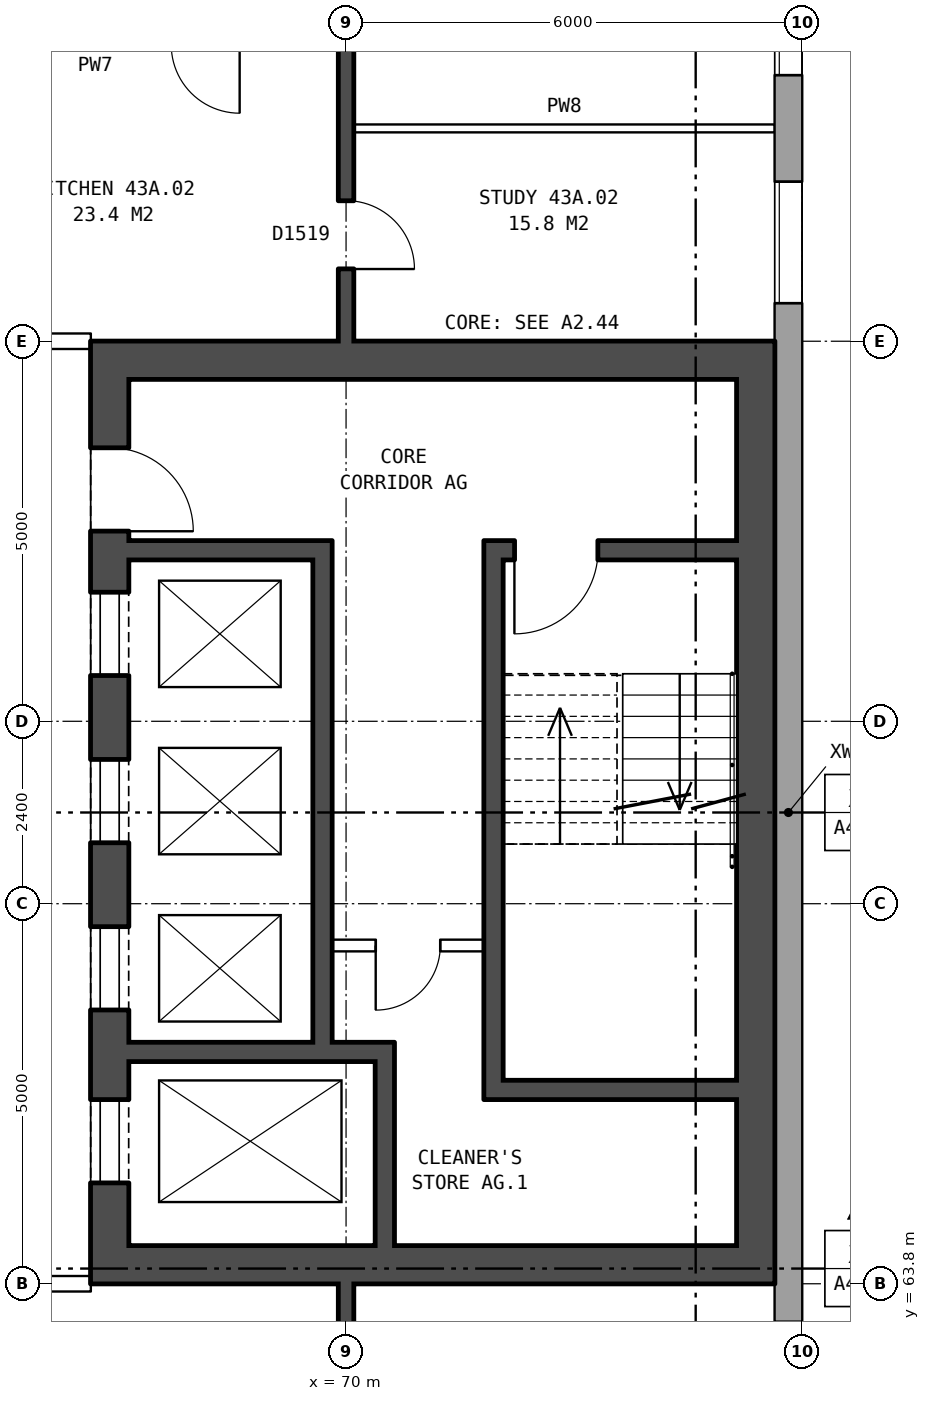
"""IFC4 building model, lengths in metres.
Left out: names, types, materials, properties, quantities, classifications, styles, units other than length and angle.
Written with IfcOpenShell. Run it as: python <this file> out.ifc"""

import sys

from ifc_helpers import new_model, si_unit, direction, frame, frame_2d, origin, place, context, subcontext, project, spatial, rectangle, extrude, element, fill, save


model = new_model("IFC4")
c1 = context("Model", 3, precision=1e-05, world=origin(), true_north=direction((0.0, 1.0)))
c2 = subcontext(c1, "Body", "Model", "MODEL_VIEW")
j1 = project(units=[si_unit("LENGTHUNIT", "METRE"), si_unit("PLANEANGLEUNIT", "RADIAN")], contexts=[c1])
p1 = place(None, origin())
s1 = spatial("IfcSite", under=j1, at=p1, CompositionType="ELEMENT")
p2 = place(p1, origin())
s2 = spatial("IfcBuilding", under=s1, at=p2, CompositionType="ELEMENT")
p3 = place(p2, frame((0.0, 0.0, 154.7)))
s3 = spatial("IfcBuildingStorey", under=s2, at=p3, CompositionType="ELEMENT", Elevation=154.7)
p4 = place(p3, frame((75.82, 57.075, 0.0), z_axis=(0.0, 0.0, 1.0), x_axis=(0.0, 1.0, 0.0)))
e1 = element("IfcWall", 1, at=p4, inside=s3, PredefinedType="STANDARD", context=c2, shape_type="SweptSolid", body=[
    extrude(rectangle(XDim=25.851, YDim=0.36, at=frame_2d((12.925, 0.0))), origin(), (0.0, 0.0, 1.0), 2.85),
])
p5 = place(p4, frame((1.625, 0.0, 0.8)))
e2 = element("IfcOpeningElement", 2, at=p5, cuts=e1, PredefinedType="OPENING", context=c2, shape_type="SweptSolid", body=[
    extrude(rectangle(XDim=1.6, YDim=1.8, at=frame_2d((0.8, 0.9))), frame((0.0, 0.19, 0.0), z_axis=(0.0, -1.0, 0.0), x_axis=(1.0, 0.0, 0.0)), (0.0, 0.0, 1.0), 0.38),
])
p6 = place(p4, frame((4.625, 0.0, 0.8)))
e3 = element("IfcOpeningElement", 3, at=p6, cuts=e1, PredefinedType="OPENING", context=c2, shape_type="SweptSolid", body=[
    extrude(rectangle(XDim=1.6, YDim=1.8, at=frame_2d((0.8, 0.9))), frame((0.0, 0.19, 0.0), z_axis=(0.0, -1.0, 0.0), x_axis=(1.0, 0.0, 0.0)), (0.0, 0.0, 1.0), 0.38),
])
p7 = place(p4, frame((19.625, 0.0, 0.8)))
e4 = element("IfcOpeningElement", 4, at=p7, cuts=e1, PredefinedType="OPENING", context=c2, shape_type="SweptSolid", body=[
    extrude(rectangle(XDim=1.6, YDim=1.8, at=frame_2d((0.8, 0.9))), frame((0.0, 0.19, 0.0), z_axis=(0.0, -1.0, 0.0), x_axis=(1.0, 0.0, 0.0)), (0.0, 0.0, 1.0), 0.38),
])
p8 = place(p4, frame((22.625, 0.0, 0.8)))
e5 = element("IfcOpeningElement", 5, at=p8, cuts=e1, PredefinedType="OPENING", context=c2, shape_type="SweptSolid", body=[
    extrude(rectangle(XDim=1.6, YDim=1.8, at=frame_2d((0.8, 0.9))), frame((0.0, 0.19, 0.0), z_axis=(0.0, -1.0, 0.0), x_axis=(1.0, 0.0, 0.0)), (0.0, 0.0, 1.0), 0.38),
])
p9 = place(p3, frame((66.89, 63.8, 0.0), z_axis=(0.0, 0.0, 1.0), x_axis=(0.0, 1.0, 0.0)))
e6 = element("IfcWall", 6, at=p9, inside=s3, PredefinedType="SHEAR", context=c2, shape_type="SweptSolid", body=[
    extrude(rectangle(XDim=12.4, YDim=0.5, at=frame_2d((6.2, 0.0))), origin(), (0.0, 0.0, 1.0), 2.85),
])
p10 = place(p9, frame((1.325, 0.0, 0.0)))
e7 = element("IfcOpeningElement", 7, at=p10, cuts=e6, PredefinedType="OPENING", context=c2, shape_type="SweptSolid", body=[
    extrude(rectangle(XDim=1.1, YDim=2.1, at=frame_2d((0.55, 1.05))), frame((0.0, 0.26, 0.0), z_axis=(0.0, -1.0, 0.0), x_axis=(1.0, 0.0, 0.0)), (0.0, 0.0, 1.0), 0.52),
])
p11 = place(p9, frame((3.6, 0.0, 0.0)))
e8 = element("IfcOpeningElement", 8, at=p11, cuts=e6, PredefinedType="OPENING", context=c2, shape_type="SweptSolid", body=[
    extrude(rectangle(XDim=1.1, YDim=2.1, at=frame_2d((0.55, 1.05))), frame((0.0, 0.26, 0.0), z_axis=(0.0, -1.0, 0.0), x_axis=(1.0, 0.0, 0.0)), (0.0, 0.0, 1.0), 0.52),
])
p12 = place(p9, frame((5.8, 0.0, 0.0)))
e9 = element("IfcOpeningElement", 9, at=p12, cuts=e6, PredefinedType="OPENING", context=c2, shape_type="SweptSolid", body=[
    extrude(rectangle(XDim=1.1, YDim=2.1, at=frame_2d((0.55, 1.05))), frame((0.0, 0.26, 0.0), z_axis=(0.0, -1.0, 0.0), x_axis=(1.0, 0.0, 0.0)), (0.0, 0.0, 1.0), 0.52),
])
p13 = place(p9, frame((8.0, 0.0, 0.0)))
e10 = element("IfcOpeningElement", 10, at=p13, cuts=e6, PredefinedType="OPENING", context=c2, shape_type="SweptSolid", body=[
    extrude(rectangle(XDim=1.1, YDim=2.1, at=frame_2d((0.55, 1.05))), frame((0.0, 0.26, 0.0), z_axis=(0.0, -1.0, 0.0), x_axis=(1.0, 0.0, 0.0)), (0.0, 0.0, 1.0), 0.52),
])
p14 = place(p9, frame((9.9, 0.0, 0.0)))
e11 = element("IfcOpeningElement", 11, at=p14, cuts=e6, PredefinedType="OPENING", context=c2, shape_type="SweptSolid", body=[
    extrude(rectangle(XDim=1.1, YDim=2.1, at=frame_2d((0.55, 1.05))), frame((0.0, 0.26, 0.0), z_axis=(0.0, -1.0, 0.0), x_axis=(1.0, 0.0, 0.0)), (0.0, 0.0, 1.0), 0.52),
])
p15 = place(p3, frame((75.39, 63.8, 0.0), z_axis=(0.0, 0.0, 1.0), x_axis=(0.0, 1.0, 0.0)))
e12 = element("IfcWall", 12, at=p15, inside=s3, PredefinedType="SHEAR", context=c2, shape_type="SweptSolid", body=[
    extrude(rectangle(XDim=12.4, YDim=0.5, at=frame_2d((6.2, 0.0))), origin(), (0.0, 0.0, 1.0), 2.85),
])
for number, where, z_axis, x_axis in (
    (13, (67.14, 64.05, 0.0), (0.0, 0.0, 1.0), (1.0, 0.0, 0.0)),
    (14, (67.14, 75.95, 0.0), (0.0, 0.0, 1.0), (1.0, 0.0, 0.0)),
):
    element("IfcWall", number, at=place(p3, frame(where, z_axis=z_axis, x_axis=x_axis)), inside=s3, PredefinedType="SHEAR", context=c2, shape_type="SweptSolid", body=[
        extrude(rectangle(XDim=8.0, YDim=0.5, at=frame_2d((4.0, 0.0))), origin(), (0.0, 0.0, 1.0), 2.85),
    ])
p16 = place(p3, frame((72.065, 66.35, 0.0), z_axis=(0.0, 0.0, 1.0), x_axis=(1.0, 0.0, 0.0)))
e15 = element("IfcWall", 15, at=p16, inside=s3, PredefinedType="SHEAR", context=c2, shape_type="SweptSolid", body=[
    extrude(rectangle(XDim=3.075, YDim=0.25, at=frame_2d((1.538, 0.0))), origin(), (0.0, 0.0, 1.0), 2.85),
])
p17 = place(p3, frame((67.14, 66.85, 0.0), z_axis=(0.0, 0.0, 1.0), x_axis=(1.0, 0.0, 0.0)))
e16 = element("IfcWall", 16, at=p17, inside=s3, PredefinedType="SHEAR", context=c2, shape_type="SweptSolid", body=[
    extrude(rectangle(XDim=3.495, YDim=0.25, at=frame_2d((1.748, 0.0))), origin(), (0.0, 0.0, 1.0), 2.85),
])
p18 = place(p3, frame((69.815, 68.25, 0.0), z_axis=(0.0, 0.0, 1.0), x_axis=(1.0, 0.0, 0.0)))
e17 = element("IfcWall", 17, at=p18, inside=s3, PredefinedType="PARTITIONING", context=c2, shape_type="SweptSolid", body=[
    extrude(rectangle(XDim=2.0, YDim=0.15, at=frame_2d((1.0, 0.0))), origin(), (0.0, 0.0, 1.0), 2.85),
])
p19 = place(p18, frame((0.575, 0.0, 0.0)))
e18 = element("IfcOpeningElement", 18, at=p19, cuts=e17, PredefinedType="OPENING", context=c2, shape_type="SweptSolid", body=[
    extrude(rectangle(XDim=0.85, YDim=2.1, at=frame_2d((0.425, 1.05))), frame((0.0, 0.085, 0.0), z_axis=(0.0, -1.0, 0.0), x_axis=(1.0, 0.0, 0.0)), (0.0, 0.0, 1.0), 0.17),
])
p20 = place(p3, frame((67.14, 73.45, 0.0), z_axis=(0.0, 0.0, 1.0), x_axis=(1.0, 0.0, 0.0)))
e19 = element("IfcWall", 19, at=p20, inside=s3, PredefinedType="SHEAR", context=c2, shape_type="SweptSolid", body=[
    extrude(rectangle(XDim=2.425, YDim=0.25, at=frame_2d((1.212, 0.0))), origin(), (0.0, 0.0, 1.0), 2.85),
])
p21 = place(p3, frame((72.065, 73.45, 0.0), z_axis=(0.0, 0.0, 1.0), x_axis=(1.0, 0.0, 0.0)))
e20 = element("IfcWall", 20, at=p21, inside=s3, PredefinedType="SHEAR", context=c2, shape_type="SweptSolid", body=[
    extrude(rectangle(XDim=3.075, YDim=0.25, at=frame_2d((1.538, 0.0))), origin(), (0.0, 0.0, 1.0), 2.85),
])
p22 = place(p21, frame((0.15, 0.0, 0.0)))
e21 = element("IfcOpeningElement", 21, at=p22, cuts=e20, PredefinedType="OPENING", context=c2, shape_type="SweptSolid", body=[
    extrude(rectangle(XDim=1.1, YDim=2.1, at=frame_2d((0.55, 1.05))), frame((0.0, 0.135, 0.0), z_axis=(0.0, -1.0, 0.0), x_axis=(1.0, 0.0, 0.0)), (0.0, 0.0, 1.0), 0.27),
])
p23 = place(p3, frame((69.69, 66.975, 0.0), z_axis=(0.0, 0.0, 1.0), x_axis=(0.0, 1.0, 0.0)))
e22 = element("IfcWall", 22, at=p23, inside=s3, PredefinedType="SHEAR", context=c2, shape_type="SweptSolid", body=[
    extrude(rectangle(XDim=6.6, YDim=0.25, at=frame_2d((3.3, 0.0))), origin(), (0.0, 0.0, 1.0), 2.85),
])
p24 = place(p3, frame((70.51, 64.3, 0.0), z_axis=(0.0, 0.0, 1.0), x_axis=(0.0, 1.0, 0.0)))
e23 = element("IfcWall", 23, at=p24, inside=s3, PredefinedType="SHEAR", context=c2, shape_type="SweptSolid", body=[
    extrude(rectangle(XDim=2.425, YDim=0.25, at=frame_2d((1.212, 0.0))), origin(), (0.0, 0.0, 1.0), 2.85),
])
p25 = place(p3, frame((71.94, 66.225, 0.0), z_axis=(0.0, 0.0, 1.0), x_axis=(0.0, 1.0, 0.0)))
e24 = element("IfcWall", 24, at=p25, inside=s3, PredefinedType="SHEAR", context=c2, shape_type="SweptSolid", body=[
    extrude(rectangle(XDim=7.35, YDim=0.25, at=frame_2d((3.675, 0.0))), origin(), (0.0, 0.0, 1.0), 2.85),
])
p26 = place(p3, frame((63.64, 63.8, 0.0), z_axis=(0.0, 0.0, 1.0), x_axis=(1.0, 0.0, 0.0)))
e25 = element("IfcWall", 25, at=p26, inside=s3, PredefinedType="PARTITIONING", context=c2, shape_type="SweptSolid", body=[
    extrude(rectangle(XDim=3.0, YDim=0.2, at=frame_2d((1.5, 0.0))), origin(), (0.0, 0.0, 1.0), 2.85),
])
p27 = place(p26, frame((1.18, 0.0, 0.0)))
e26 = element("IfcOpeningElement", 26, at=p27, cuts=e25, PredefinedType="OPENING", context=c2, shape_type="SweptSolid", body=[
    extrude(rectangle(XDim=1.0, YDim=2.1, at=frame_2d((0.5, 1.05))), frame((0.0, 0.11, 0.0), z_axis=(0.0, -1.0, 0.0), x_axis=(1.0, 0.0, 0.0)), (0.0, 0.0, 1.0), 0.22),
])
p28 = place(p3, frame((63.64, 76.2, 0.0), z_axis=(0.0, 0.0, 1.0), x_axis=(1.0, 0.0, 0.0)))
e27 = element("IfcWall", 27, at=p28, inside=s3, PredefinedType="PARTITIONING", context=c2, shape_type="SweptSolid", body=[
    extrude(rectangle(XDim=3.0, YDim=0.2, at=frame_2d((1.5, 0.0))), origin(), (0.0, 0.0, 1.0), 2.85),
])
p29 = place(p28, frame((1.18, 0.0, 0.0)))
e28 = element("IfcOpeningElement", 28, at=p29, cuts=e27, PredefinedType="OPENING", context=c2, shape_type="SweptSolid", body=[
    extrude(rectangle(XDim=1.0, YDim=2.1, at=frame_2d((0.5, 1.05))), frame((0.0, 0.11, 0.0), z_axis=(0.0, -1.0, 0.0), x_axis=(1.0, 0.0, 0.0)), (0.0, 0.0, 1.0), 0.22),
])
p30 = place(p3, frame((70.1, 79.0, 0.0), z_axis=(0.0, 0.0, 1.0), x_axis=(1.0, 0.0, 0.0)))
e29 = element("IfcWall", 29, at=p30, inside=s3, PredefinedType="PARTITIONING", context=c2, shape_type="SweptSolid", body=[
    extrude(rectangle(XDim=5.54, YDim=0.1, at=frame_2d((2.77, 0.0))), origin(), (0.0, 0.0, 1.0), 2.85),
])
p31 = place(p3, frame((70.0, 54.36, 0.0), z_axis=(0.0, 0.0, 1.0), x_axis=(0.0, 1.0, 0.0)))
e30 = element("IfcWall", 30, at=p31, inside=s3, PredefinedType="SOLIDWALL", context=c2, shape_type="SweptSolid", body=[
    extrude(rectangle(XDim=9.44, YDim=0.2, at=frame_2d((4.72, 0.0))), origin(), (0.0, 0.0, 1.0), 2.85),
])
p32 = place(p31, frame((7.04, 0.0, 0.0)))
e31 = element("IfcOpeningElement", 31, at=p32, cuts=e30, PredefinedType="OPENING", context=c2, shape_type="SweptSolid", body=[
    extrude(rectangle(XDim=0.9, YDim=2.1, at=frame_2d((0.45, 1.05))), frame((0.0, 0.11, 0.0), z_axis=(0.0, -1.0, 0.0), x_axis=(1.0, 0.0, 0.0)), (0.0, 0.0, 1.0), 0.22),
])
p33 = place(p3, frame((70.0, 76.2, 0.0), z_axis=(0.0, 0.0, 1.0), x_axis=(0.0, 1.0, 0.0)))
e32 = element("IfcWall", 32, at=p33, inside=s3, PredefinedType="SOLIDWALL", context=c2, shape_type="SweptSolid", body=[
    extrude(rectangle(XDim=9.44, YDim=0.2, at=frame_2d((4.72, 0.0))), origin(), (0.0, 0.0, 1.0), 2.85),
])
p34 = place(p33, frame((6.22, 0.0, 0.0)))
e33 = element("IfcOpeningElement", 33, at=p34, cuts=e32, PredefinedType="OPENING", context=c2, shape_type="SweptSolid", body=[
    extrude(rectangle(XDim=0.9, YDim=2.1, at=frame_2d((0.45, 1.05))), frame((0.0, 0.11, 0.0), z_axis=(0.0, -1.0, 0.0), x_axis=(1.0, 0.0, 0.0)), (0.0, 0.0, 1.0), 0.22),
])
p35 = place(p33, frame((0.95, 0.0, 0.0)))
e34 = element("IfcOpeningElement", 34, at=p35, cuts=e32, PredefinedType="OPENING", context=c2, shape_type="SweptSolid", body=[
    extrude(rectangle(XDim=0.9, YDim=2.1, at=frame_2d((0.45, 1.05))), frame((0.0, 0.11, 0.0), z_axis=(0.0, -1.0, 0.0), x_axis=(1.0, 0.0, 0.0)), (0.0, 0.0, 1.0), 0.22),
])
p36 = place(p6, origin())
e35 = element("IfcWindow", 35, at=p36, inside=s3, PartitioningType="SINGLE_PANEL", PredefinedType="WINDOW", context=c2, shape_type="SweptSolid", body=[
    extrude(rectangle(XDim=1.6, YDim=1.8, at=frame_2d((0.8, 0.9))), frame((0.0, 0.15, 0.0), z_axis=(0.0, -1.0, 0.0), x_axis=(1.0, 0.0, 0.0)), (0.0, 0.0, 1.0), 0.06),
])
fill(e3, e35)
p37 = place(p7, origin())
e36 = element("IfcWindow", 36, at=p37, inside=s3, PartitioningType="SINGLE_PANEL", PredefinedType="WINDOW", context=c2, shape_type="SweptSolid", body=[
    extrude(rectangle(XDim=1.6, YDim=1.8, at=frame_2d((0.8, 0.9))), frame((0.0, 0.15, 0.0), z_axis=(0.0, -1.0, 0.0), x_axis=(1.0, 0.0, 0.0)), (0.0, 0.0, 1.0), 0.06),
])
fill(e4, e36)
p38 = place(p8, origin())
e37 = element("IfcWindow", 37, at=p38, inside=s3, PartitioningType="SINGLE_PANEL", PredefinedType="WINDOW", context=c2, shape_type="SweptSolid", body=[
    extrude(rectangle(XDim=1.6, YDim=1.8, at=frame_2d((0.8, 0.9))), frame((0.0, 0.15, 0.0), z_axis=(0.0, -1.0, 0.0), x_axis=(1.0, 0.0, 0.0)), (0.0, 0.0, 1.0), 0.06),
])
fill(e5, e37)
p39 = place(p10, origin())
e38 = element("IfcDoor", 38, at=p39, inside=s3, OperationType="DOUBLE_DOOR_SLIDING", PredefinedType="DOOR", context=c2, shape_type="SweptSolid", body=[
    extrude(rectangle(XDim=1.1, YDim=2.1, at=frame_2d((0.55, 1.05))), frame((0.0, -0.185, 0.0), z_axis=(0.0, -1.0, 0.0), x_axis=(1.0, 0.0, 0.0)), (0.0, 0.0, 1.0), 0.05),
])
fill(e7, e38)
p40 = place(p11, origin())
e39 = element("IfcDoor", 39, at=p40, inside=s3, OperationType="DOUBLE_DOOR_SLIDING", PredefinedType="DOOR", context=c2, shape_type="SweptSolid", body=[
    extrude(rectangle(XDim=1.1, YDim=2.1, at=frame_2d((0.55, 1.05))), frame((0.0, -0.185, 0.0), z_axis=(0.0, -1.0, 0.0), x_axis=(1.0, 0.0, 0.0)), (0.0, 0.0, 1.0), 0.05),
])
fill(e8, e39)
p41 = place(p12, origin())
e40 = element("IfcDoor", 40, at=p41, inside=s3, OperationType="DOUBLE_DOOR_SLIDING", PredefinedType="DOOR", context=c2, shape_type="SweptSolid", body=[
    extrude(rectangle(XDim=1.1, YDim=2.1, at=frame_2d((0.55, 1.05))), frame((0.0, -0.185, 0.0), z_axis=(0.0, -1.0, 0.0), x_axis=(1.0, 0.0, 0.0)), (0.0, 0.0, 1.0), 0.05),
])
fill(e9, e40)
p42 = place(p13, origin())
e41 = element("IfcDoor", 41, at=p42, inside=s3, OperationType="DOUBLE_DOOR_SLIDING", PredefinedType="DOOR", context=c2, shape_type="SweptSolid", body=[
    extrude(rectangle(XDim=1.1, YDim=2.1, at=frame_2d((0.55, 1.05))), frame((0.0, -0.185, 0.0), z_axis=(0.0, -1.0, 0.0), x_axis=(1.0, 0.0, 0.0)), (0.0, 0.0, 1.0), 0.05),
])
fill(e10, e41)
p43 = place(p14, frame((1.1, 0.0, 0.0), z_axis=(0.0, 0.0, 1.0), x_axis=(-1.0, 0.0, 0.0)))
e42 = element("IfcDoor", 42, at=p43, inside=s3, OperationType="SINGLE_SWING_RIGHT", PredefinedType="DOOR", context=c2, shape_type="SweptSolid", body=[
    extrude(rectangle(XDim=1.1, YDim=2.1, at=frame_2d((0.55, 1.05))), frame((0.0, 0.235, 0.0), z_axis=(0.0, -1.0, 0.0), x_axis=(1.0, 0.0, 0.0)), (0.0, 0.0, 1.0), 0.05),
])
fill(e11, e42)
p44 = place(p22, frame((1.1, 0.0, 0.0), z_axis=(0.0, 0.0, 1.0), x_axis=(-1.0, 0.0, 0.0)))
e43 = element("IfcDoor", 43, at=p44, inside=s3, OperationType="SINGLE_SWING_RIGHT", PredefinedType="DOOR", context=c2, shape_type="SweptSolid", body=[
    extrude(rectangle(XDim=1.1, YDim=2.1, at=frame_2d((0.55, 1.05))), frame((0.0, 0.025, 0.0), z_axis=(0.0, -1.0, 0.0), x_axis=(1.0, 0.0, 0.0)), (0.0, 0.0, 1.0), 0.05),
])
fill(e21, e43)
p45 = place(p19, frame((0.85, 0.0, 0.0), z_axis=(0.0, 0.0, 1.0), x_axis=(-1.0, 0.0, 0.0)))
e44 = element("IfcDoor", 44, at=p45, inside=s3, OperationType="SINGLE_SWING_RIGHT", PredefinedType="DOOR", context=c2, shape_type="SweptSolid", body=[
    extrude(rectangle(XDim=0.85, YDim=2.1, at=frame_2d((0.425, 1.05))), frame((0.0, 0.025, 0.0), z_axis=(0.0, -1.0, 0.0), x_axis=(1.0, 0.0, 0.0)), (0.0, 0.0, 1.0), 0.05),
])
fill(e18, e44)
p46 = place(p35, frame((0.9, 0.0, 0.0), z_axis=(0.0, 0.0, 1.0), x_axis=(-1.0, 0.0, 0.0)))
e45 = element("IfcDoor", 45, at=p46, inside=s3, OperationType="SINGLE_SWING_RIGHT", PredefinedType="DOOR", context=c2, shape_type="SweptSolid", body=[
    extrude(rectangle(XDim=0.9, YDim=2.1, at=frame_2d((0.45, 1.05))), frame((0.0, 0.025, 0.0), z_axis=(0.0, -1.0, 0.0), x_axis=(1.0, 0.0, 0.0)), (0.0, 0.0, 1.0), 0.05),
])
fill(e34, e45)
save(model, sys.argv[1])
